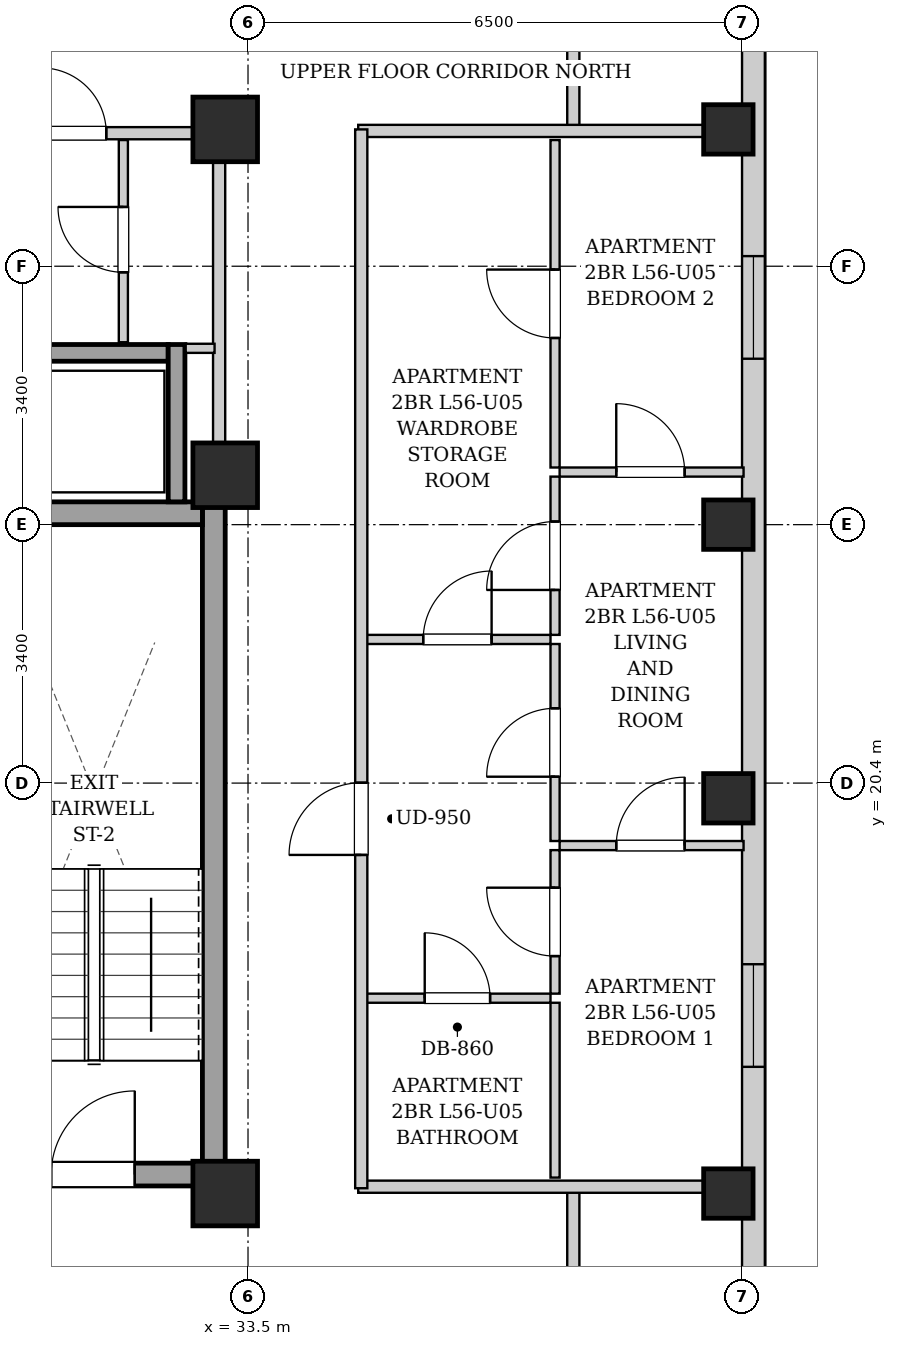
"""IFC4 building model, lengths in metres.
Left out: names, types, materials, properties, quantities, classifications, styles, units other than length and angle.
Written with IfcOpenShell. Run it as: python <this file> out.ifc"""

import sys

from ifc_helpers import new_model, si_unit, direction, frame, frame_2d, origin, origin_2d, place, context, subcontext, project, spatial, rectangle, extrude, element, fill, save


model = new_model("IFC4")
c1 = context("Model", 3, precision=1e-05, world=origin(), true_north=direction((0.0, 1.0)))
c2 = subcontext(c1, "Body", "Model", "MODEL_VIEW")
j1 = project(units=[si_unit("LENGTHUNIT", "METRE"), si_unit("PLANEANGLEUNIT", "RADIAN")], contexts=[c1])
p1 = place(None, origin())
s1 = spatial("IfcSite", under=j1, at=p1, CompositionType="ELEMENT")
p2 = place(p1, origin())
s2 = spatial("IfcBuilding", under=s1, at=p2, CompositionType="ELEMENT")
p3 = place(p2, frame((0.0, 0.0, 194.2)))
s3 = spatial("IfcBuildingStorey", under=s2, at=p3, CompositionType="ELEMENT", Elevation=194.2)
for number, where, z_axis, x_axis in (
    (1, (39.82, 15.0, 0.0), (0.0, 0.0, 1.0), (1.0, 0.0, 0.0)),
    (2, (39.82, 20.2, 0.0), (0.0, 0.0, 1.0), (1.0, 0.0, 0.0)),
    (3, (39.82, 23.8, 0.0), (0.0, 0.0, 1.0), (1.0, 0.0, 0.0)),
    (4, (39.82, 29.0, 0.0), (0.0, 0.0, 1.0), (1.0, 0.0, 0.0)),
):
    element("IfcColumn", number, at=place(p3, frame(where, z_axis=z_axis, x_axis=x_axis)), inside=s3, PredefinedType="COLUMN", context=c2, shape_type="SweptSolid", body=[
        extrude(rectangle(XDim=0.65, YDim=0.65, at=origin_2d()), origin(), (0.0, 0.0, 1.0), 3.3),
    ])
for number, where, z_axis, x_axis in (
    (5, (33.2, 15.0, 0.0), (0.0, 0.0, 1.0), (1.0, 0.0, 0.0)),
    (6, (33.2, 29.0, 0.0), (0.0, 0.0, 1.0), (1.0, 0.0, 0.0)),
    (7, (33.2, 24.45, 0.0), (0.0, 0.0, 1.0), (1.0, 0.0, 0.0)),
):
    element("IfcColumn", number, at=place(p3, frame(where, z_axis=z_axis, x_axis=x_axis)), inside=s3, PredefinedType="COLUMN", context=c2, shape_type="SweptSolid", body=[
        extrude(rectangle(XDim=0.85, YDim=0.85, at=origin_2d()), origin(), (0.0, 0.0, 1.0), 3.3),
    ])
p4 = place(p3, frame((40.15, 37.7, 0.0), z_axis=(0.0, 0.0, 1.0), x_axis=(0.0, -1.0, 0.0)))
e8 = element("IfcWall", 8, at=p4, inside=s3, PredefinedType="SOLIDWALL", context=c2, shape_type="SweptSolid", body=[
    extrude(rectangle(XDim=31.4, YDim=0.3, at=frame_2d((15.7, 0.0))), origin(), (0.0, 0.0, 1.0), 3.04),
])
p5 = place(p4, frame((28.396, 0.0, 0.55)))
e9 = element("IfcOpeningElement", 9, at=p5, cuts=e8, PredefinedType="OPENING", context=c2, shape_type="SweptSolid", body=[
    extrude(rectangle(XDim=1.35, YDim=1.2, at=frame_2d((0.675, 0.6))), frame((0.0, 0.16, 0.0), z_axis=(0.0, -1.0, 0.0), x_axis=(1.0, 0.0, 0.0)), (0.0, 0.0, 1.0), 0.32),
])
p6 = place(p4, frame((1.653, 0.0, 0.55)))
e10 = element("IfcOpeningElement", 10, at=p6, cuts=e8, PredefinedType="OPENING", context=c2, shape_type="SweptSolid", body=[
    extrude(rectangle(XDim=1.35, YDim=1.2, at=frame_2d((0.675, 0.6))), frame((0.0, 0.16, 0.0), z_axis=(0.0, -1.0, 0.0), x_axis=(1.0, 0.0, 0.0)), (0.0, 0.0, 1.0), 0.32),
])
p7 = place(p4, frame((19.683, 0.0, 0.55)))
e11 = element("IfcOpeningElement", 11, at=p7, cuts=e8, PredefinedType="OPENING", context=c2, shape_type="SweptSolid", body=[
    extrude(rectangle(XDim=1.35, YDim=1.2, at=frame_2d((0.675, 0.6))), frame((0.0, 0.16, 0.0), z_axis=(0.0, -1.0, 0.0), x_axis=(1.0, 0.0, 0.0)), (0.0, 0.0, 1.0), 0.32),
])
p8 = place(p4, frame((10.367, 0.0, 0.55)))
e12 = element("IfcOpeningElement", 12, at=p8, cuts=e8, PredefinedType="OPENING", context=c2, shape_type="SweptSolid", body=[
    extrude(rectangle(XDim=1.35, YDim=1.2, at=frame_2d((0.675, 0.6))), frame((0.0, 0.16, 0.0), z_axis=(0.0, -1.0, 0.0), x_axis=(1.0, 0.0, 0.0)), (0.0, 0.0, 1.0), 0.32),
])
p9 = place(p3, frame((33.05, 15.1, 0.0), z_axis=(0.0, 0.0, 1.0), x_axis=(0.0, 1.0, 0.0)))
e13 = element("IfcWall", 13, at=p9, inside=s3, PredefinedType="SHEAR", context=c2, shape_type="SweptSolid", body=[
    extrude(rectangle(XDim=9.0, YDim=0.3, at=frame_2d((4.5, 0.0))), origin(), (0.0, 0.0, 1.0), 3.04),
])
p10 = place(p3, frame((30.05, 23.95, 0.0), z_axis=(0.0, 0.0, 1.0), x_axis=(1.0, 0.0, 0.0)))
e14 = element("IfcWall", 14, at=p10, inside=s3, PredefinedType="SHEAR", context=c2, shape_type="SweptSolid", body=[
    extrude(rectangle(XDim=2.85, YDim=0.3, at=frame_2d((1.425, 0.0))), origin(), (0.0, 0.0, 1.0), 3.04),
])
p11 = place(p3, frame((30.05, 15.25, 0.0), z_axis=(0.0, 0.0, 1.0), x_axis=(1.0, 0.0, 0.0)))
e15 = element("IfcWall", 15, at=p11, inside=s3, PredefinedType="SHEAR", context=c2, shape_type="SweptSolid", body=[
    extrude(rectangle(XDim=2.85, YDim=0.3, at=frame_2d((1.425, 0.0))), origin(), (0.0, 0.0, 1.0), 3.04),
])
p12 = place(p11, frame((0.86, 0.0, 0.0)))
e16 = element("IfcOpeningElement", 16, at=p12, cuts=e15, PredefinedType="OPENING", context=c2, shape_type="SweptSolid", body=[
    extrude(rectangle(XDim=1.1, YDim=2.05, at=frame_2d((0.55, 1.025))), frame((0.0, 0.16, 0.0), z_axis=(0.0, -1.0, 0.0), x_axis=(1.0, 0.0, 0.0)), (0.0, 0.0, 1.0), 0.32),
])
p13 = place(p3, frame((30.55, 26.06, 0.0), z_axis=(0.0, 0.0, 1.0), x_axis=(1.0, 0.0, 0.0)))
e17 = element("IfcWall", 17, at=p13, inside=s3, PredefinedType="SHEAR", context=c2, shape_type="SweptSolid", body=[
    extrude(rectangle(XDim=1.9, YDim=0.22, at=frame_2d((0.95, 0.0))), origin(), (0.0, 0.0, 1.0), 3.04),
])
p14 = place(p3, frame((32.56, 24.1, 0.0), z_axis=(0.0, 0.0, 1.0), x_axis=(0.0, 1.0, 0.0)))
e18 = element("IfcWall", 18, at=p14, inside=s3, PredefinedType="SHEAR", context=c2, shape_type="SweptSolid", body=[
    extrude(rectangle(XDim=2.07, YDim=0.22, at=frame_2d((1.035, 0.0))), origin(), (0.0, 0.0, 1.0), 3.04),
])
p15 = place(p3, frame((33.12, 24.12, 0.0), z_axis=(0.0, 0.0, 1.0), x_axis=(0.0, 1.0, 0.0)))
e19 = element("IfcWall", 19, at=p15, inside=s3, PredefinedType="PARTITIONING", context=c2, shape_type="SweptSolid", body=[
    extrude(rectangle(XDim=4.76, YDim=0.16, at=frame_2d((2.38, 0.0))), origin(), (0.0, 0.0, 1.0), 3.04),
])
p16 = place(p3, frame((32.68, 26.12, 0.0), z_axis=(0.0, 0.0, 1.0), x_axis=(1.0, 0.0, 0.0)))
e20 = element("IfcWall", 20, at=p16, inside=s3, PredefinedType="PARTITIONING", context=c2, shape_type="SweptSolid", body=[
    extrude(rectangle(XDim=0.38, YDim=0.12, at=frame_2d((0.19, 0.0))), origin(), (0.0, 0.0, 1.0), 3.04),
])
p17 = place(p3, frame((31.86, 26.2, 0.0), z_axis=(0.0, 0.0, 1.0), x_axis=(0.0, 1.0, 0.0)))
e21 = element("IfcWall", 21, at=p17, inside=s3, PredefinedType="PARTITIONING", context=c2, shape_type="SweptSolid", body=[
    extrude(rectangle(XDim=2.66, YDim=0.12, at=frame_2d((1.33, 0.0))), origin(), (0.0, 0.0, 1.0), 3.04),
])
p18 = place(p17, frame((0.92, 0.0, 0.0)))
e22 = element("IfcOpeningElement", 22, at=p18, cuts=e21, PredefinedType="OPENING", context=c2, shape_type="SweptSolid", body=[
    extrude(rectangle(XDim=0.86, YDim=2.05, at=frame_2d((0.43, 1.025))), frame((0.0, 0.07, 0.0), z_axis=(0.0, -1.0, 0.0), x_axis=(1.0, 0.0, 0.0)), (0.0, 0.0, 1.0), 0.14),
])
p19 = place(p3, frame((30.08, 28.95, 0.0), z_axis=(0.0, 0.0, 1.0), x_axis=(1.0, 0.0, 0.0)))
e23 = element("IfcWall", 23, at=p19, inside=s3, PredefinedType="PARTITIONING", context=c2, shape_type="SweptSolid", body=[
    extrude(rectangle(XDim=2.96, YDim=0.16, at=frame_2d((1.48, 0.0))), origin(), (0.0, 0.0, 1.0), 3.04),
])
p20 = place(p19, frame((0.695, 0.0, 0.0)))
e24 = element("IfcOpeningElement", 24, at=p20, cuts=e23, PredefinedType="OPENING", context=c2, shape_type="SweptSolid", body=[
    extrude(rectangle(XDim=0.86, YDim=2.05, at=frame_2d((0.43, 1.025))), frame((0.0, 0.09, 0.0), z_axis=(0.0, -1.0, 0.0), x_axis=(1.0, 0.0, 0.0)), (0.0, 0.0, 1.0), 0.18),
])
for number, where, z_axis, x_axis in (
    (25, (37.78, 13.51, 0.0), (0.0, 0.0, 1.0), (0.0, 1.0, 0.0)),
    (26, (37.78, 28.98, 0.0), (0.0, 0.0, 1.0), (0.0, 1.0, 0.0)),
):
    element("IfcWall", number, at=place(p3, frame(where, z_axis=z_axis, x_axis=x_axis)), inside=s3, PredefinedType="PARTITIONING", context=c2, shape_type="SweptSolid", body=[
        extrude(rectangle(XDim=1.58, YDim=0.16, at=frame_2d((0.79, 0.0))), origin(), (0.0, 0.0, 1.0), 3.04),
    ])
for number, where, z_axis, x_axis in (
    (27, (34.95, 15.09, 0.0), (0.0, 0.0, 1.0), (1.0, 0.0, 0.0)),
    (28, (34.95, 28.98, 0.0), (0.0, 0.0, 1.0), (1.0, 0.0, 0.0)),
):
    element("IfcWall", number, at=place(p3, frame(where, z_axis=z_axis, x_axis=x_axis)), inside=s3, PredefinedType="PARTITIONING", context=c2, shape_type="SweptSolid", body=[
        extrude(rectangle(XDim=5.07, YDim=0.16, at=frame_2d((2.535, 0.0))), origin(), (0.0, 0.0, 1.0), 2.556),
    ])
p21 = place(p3, frame((35.03, 22.29, 0.0), z_axis=(0.0, 0.0, 1.0), x_axis=(1.0, 0.0, 0.0)))
e29 = element("IfcWall", 29, at=p21, inside=s3, PredefinedType="PARTITIONING", context=c2, shape_type="SweptSolid", body=[
    extrude(rectangle(XDim=2.45, YDim=0.12, at=frame_2d((1.225, 0.0))), origin(), (0.0, 0.0, 1.0), 3.04),
])
p22 = place(p21, frame((0.775, 0.0, 0.0)))
e30 = element("IfcOpeningElement", 30, at=p22, cuts=e29, PredefinedType="OPENING", context=c2, shape_type="SweptSolid", body=[
    extrude(rectangle(XDim=0.9, YDim=2.05, at=frame_2d((0.45, 1.025))), frame((0.0, 0.07, 0.0), z_axis=(0.0, -1.0, 0.0), x_axis=(1.0, 0.0, 0.0)), (0.0, 0.0, 1.0), 0.14),
])
p23 = place(p3, frame((37.54, 22.35, 0.0), z_axis=(0.0, 0.0, 1.0), x_axis=(0.0, 1.0, 0.0)))
e31 = element("IfcWall", 31, at=p23, inside=s3, PredefinedType="PARTITIONING", context=c2, shape_type="SweptSolid", body=[
    extrude(rectangle(XDim=2.082, YDim=0.12, at=frame_2d((1.041, 0.0))), origin(), (0.0, 0.0, 1.0), 3.04),
])
p24 = place(p23, frame((0.591, 0.0, 0.0)))
e32 = element("IfcOpeningElement", 32, at=p24, cuts=e31, PredefinedType="OPENING", context=c2, shape_type="SweptSolid", body=[
    extrude(rectangle(XDim=0.9, YDim=2.05, at=frame_2d((0.45, 1.025))), frame((0.0, 0.07, 0.0), z_axis=(0.0, -1.0, 0.0), x_axis=(1.0, 0.0, 0.0)), (0.0, 0.0, 1.0), 0.14),
])
p25 = place(p3, frame((37.54, 24.552, 0.0), z_axis=(0.0, 0.0, 1.0), x_axis=(0.0, 1.0, 0.0)))
e33 = element("IfcWall", 33, at=p25, inside=s3, PredefinedType="PARTITIONING", context=c2, shape_type="SweptSolid", body=[
    extrude(rectangle(XDim=4.308, YDim=0.12, at=frame_2d((2.154, 0.0))), origin(), (0.0, 0.0, 1.0), 3.04),
])
p26 = place(p25, frame((1.704, 0.0, 0.0)))
e34 = element("IfcOpeningElement", 34, at=p26, cuts=e33, PredefinedType="OPENING", context=c2, shape_type="SweptSolid", body=[
    extrude(rectangle(XDim=0.9, YDim=2.05, at=frame_2d((0.45, 1.025))), frame((0.0, 0.07, 0.0), z_axis=(0.0, -1.0, 0.0), x_axis=(1.0, 0.0, 0.0)), (0.0, 0.0, 1.0), 0.14),
])
p27 = place(p3, frame((35.03, 17.57, 0.0), z_axis=(0.0, 0.0, 1.0), x_axis=(1.0, 0.0, 0.0)))
e35 = element("IfcWall", 35, at=p27, inside=s3, PredefinedType="PARTITIONING", context=c2, shape_type="SweptSolid", body=[
    extrude(rectangle(XDim=2.45, YDim=0.12, at=frame_2d((1.225, 0.0))), origin(), (0.0, 0.0, 1.0), 3.04),
])
p28 = place(p27, frame((0.795, 0.0, 0.0)))
e36 = element("IfcOpeningElement", 36, at=p28, cuts=e35, PredefinedType="OPENING", context=c2, shape_type="SweptSolid", body=[
    extrude(rectangle(XDim=0.86, YDim=2.05, at=frame_2d((0.43, 1.025))), frame((0.0, 0.07, 0.0), z_axis=(0.0, -1.0, 0.0), x_axis=(1.0, 0.0, 0.0)), (0.0, 0.0, 1.0), 0.14),
])
p29 = place(p3, frame((37.54, 15.21, 0.0), z_axis=(0.0, 0.0, 1.0), x_axis=(0.0, 1.0, 0.0)))
e37 = element("IfcWall", 37, at=p29, inside=s3, PredefinedType="PARTITIONING", context=c2, shape_type="SweptSolid", body=[
    extrude(rectangle(XDim=2.3, YDim=0.12, at=frame_2d((1.15, 0.0))), origin(), (0.0, 0.0, 1.0), 3.04),
])
p30 = place(p3, frame((37.54, 17.63, 0.0), z_axis=(0.0, 0.0, 1.0), x_axis=(0.0, 1.0, 0.0)))
e38 = element("IfcWall", 38, at=p30, inside=s3, PredefinedType="PARTITIONING", context=c2, shape_type="SweptSolid", body=[
    extrude(rectangle(XDim=1.888, YDim=0.12, at=frame_2d((0.944, 0.0))), origin(), (0.0, 0.0, 1.0), 3.04),
])
p31 = place(p30, frame((0.494, 0.0, 0.0)))
e39 = element("IfcOpeningElement", 39, at=p31, cuts=e38, PredefinedType="OPENING", context=c2, shape_type="SweptSolid", body=[
    extrude(rectangle(XDim=0.9, YDim=2.05, at=frame_2d((0.45, 1.025))), frame((0.0, 0.07, 0.0), z_axis=(0.0, -1.0, 0.0), x_axis=(1.0, 0.0, 0.0)), (0.0, 0.0, 1.0), 0.14),
])
p32 = place(p3, frame((37.54, 19.638, 0.0), z_axis=(0.0, 0.0, 1.0), x_axis=(0.0, 1.0, 0.0)))
e40 = element("IfcWall", 40, at=p32, inside=s3, PredefinedType="PARTITIONING", context=c2, shape_type="SweptSolid", body=[
    extrude(rectangle(XDim=2.592, YDim=0.12, at=frame_2d((1.296, 0.0))), origin(), (0.0, 0.0, 1.0), 3.04),
])
p33 = place(p32, frame((0.846, 0.0, 0.0)))
e41 = element("IfcOpeningElement", 41, at=p33, cuts=e40, PredefinedType="OPENING", context=c2, shape_type="SweptSolid", body=[
    extrude(rectangle(XDim=0.9, YDim=2.05, at=frame_2d((0.45, 1.025))), frame((0.0, 0.07, 0.0), z_axis=(0.0, -1.0, 0.0), x_axis=(1.0, 0.0, 0.0)), (0.0, 0.0, 1.0), 0.14),
])
p34 = place(p3, frame((37.6, 19.578, 0.0), z_axis=(0.0, 0.0, 1.0), x_axis=(1.0, 0.0, 0.0)))
e42 = element("IfcWall", 42, at=p34, inside=s3, PredefinedType="PARTITIONING", context=c2, shape_type="SweptSolid", body=[
    extrude(rectangle(XDim=2.42, YDim=0.12, at=frame_2d((1.21, 0.0))), origin(), (0.0, 0.0, 1.0), 3.04),
])
p35 = place(p34, frame((0.745, 0.0, 0.0)))
e43 = element("IfcOpeningElement", 43, at=p35, cuts=e42, PredefinedType="OPENING", context=c2, shape_type="SweptSolid", body=[
    extrude(rectangle(XDim=0.9, YDim=2.05, at=frame_2d((0.45, 1.025))), frame((0.0, 0.07, 0.0), z_axis=(0.0, -1.0, 0.0), x_axis=(1.0, 0.0, 0.0)), (0.0, 0.0, 1.0), 0.14),
])
p36 = place(p3, frame((37.6, 24.492, 0.0), z_axis=(0.0, 0.0, 1.0), x_axis=(1.0, 0.0, 0.0)))
e44 = element("IfcWall", 44, at=p36, inside=s3, PredefinedType="PARTITIONING", context=c2, shape_type="SweptSolid", body=[
    extrude(rectangle(XDim=2.42, YDim=0.12, at=frame_2d((1.21, 0.0))), origin(), (0.0, 0.0, 1.0), 2.722),
])
p37 = place(p36, frame((0.745, 0.0, 0.0)))
e45 = element("IfcOpeningElement", 45, at=p37, cuts=e44, PredefinedType="OPENING", context=c2, shape_type="SweptSolid", body=[
    extrude(rectangle(XDim=0.9, YDim=2.05, at=frame_2d((0.45, 1.025))), frame((0.0, 0.07, 0.0), z_axis=(0.0, -1.0, 0.0), x_axis=(1.0, 0.0, 0.0)), (0.0, 0.0, 1.0), 0.14),
])
p38 = place(p3, frame((34.99, 15.07, 0.0), z_axis=(0.0, 0.0, 1.0), x_axis=(0.0, 1.0, 0.0)))
e46 = element("IfcWall", 46, at=p38, inside=s3, PredefinedType="PARTITIONING", context=c2, shape_type="SweptSolid", body=[
    extrude(rectangle(XDim=13.93, YDim=0.16, at=frame_2d((6.965, 0.0))), origin(), (0.0, 0.0, 1.0), 3.04),
])
p39 = place(p38, frame((4.385, 0.0, 0.0)))
e47 = element("IfcOpeningElement", 47, at=p39, cuts=e46, PredefinedType="OPENING", context=c2, shape_type="SweptSolid", body=[
    extrude(rectangle(XDim=0.95, YDim=2.1, at=frame_2d((0.475, 1.05))), frame((0.0, 0.09, 0.0), z_axis=(0.0, -1.0, 0.0), x_axis=(1.0, 0.0, 0.0)), (0.0, 0.0, 1.0), 0.18),
])
p40 = place(p12, origin())
e48 = element("IfcDoor", 48, at=p40, inside=s3, OperationType="SINGLE_SWING_RIGHT", PredefinedType="DOOR", context=c2, shape_type="SweptSolid", body=[
    extrude(rectangle(XDim=1.1, YDim=2.05, at=frame_2d((0.55, 1.025))), frame((0.0, 0.025, 0.0), z_axis=(0.0, -1.0, 0.0), x_axis=(1.0, 0.0, 0.0)), (0.0, 0.0, 1.0), 0.05),
])
fill(e16, e48)
p41 = place(p18, origin())
e49 = element("IfcDoor", 49, at=p41, inside=s3, OperationType="SINGLE_SWING_RIGHT", PredefinedType="DOOR", context=c2, shape_type="SweptSolid", body=[
    extrude(rectangle(XDim=0.86, YDim=2.05, at=frame_2d((0.43, 1.025))), frame((0.0, 0.025, 0.0), z_axis=(0.0, -1.0, 0.0), x_axis=(1.0, 0.0, 0.0)), (0.0, 0.0, 1.0), 0.05),
])
fill(e22, e49)
p42 = place(p20, origin())
e50 = element("IfcDoor", 50, at=p42, inside=s3, OperationType="SINGLE_SWING_LEFT", PredefinedType="DOOR", context=c2, shape_type="SweptSolid", body=[
    extrude(rectangle(XDim=0.86, YDim=2.05, at=frame_2d((0.43, 1.025))), frame((0.0, 0.025, 0.0), z_axis=(0.0, -1.0, 0.0), x_axis=(1.0, 0.0, 0.0)), (0.0, 0.0, 1.0), 0.05),
])
fill(e24, e50)
p43 = place(p22, origin())
e51 = element("IfcDoor", 51, at=p43, inside=s3, OperationType="SINGLE_SWING_RIGHT", PredefinedType="DOOR", context=c2, shape_type="SweptSolid", body=[
    extrude(rectangle(XDim=0.9, YDim=2.05, at=frame_2d((0.45, 1.025))), frame((0.0, 0.025, 0.0), z_axis=(0.0, -1.0, 0.0), x_axis=(1.0, 0.0, 0.0)), (0.0, 0.0, 1.0), 0.05),
])
fill(e30, e51)
p44 = place(p24, origin())
e52 = element("IfcDoor", 52, at=p44, inside=s3, OperationType="SINGLE_SWING_LEFT", PredefinedType="DOOR", context=c2, shape_type="SweptSolid", body=[
    extrude(rectangle(XDim=0.9, YDim=2.05, at=frame_2d((0.45, 1.025))), frame((0.0, 0.025, 0.0), z_axis=(0.0, -1.0, 0.0), x_axis=(1.0, 0.0, 0.0)), (0.0, 0.0, 1.0), 0.05),
])
fill(e32, e52)
p45 = place(p26, origin())
e53 = element("IfcDoor", 53, at=p45, inside=s3, OperationType="SINGLE_SWING_RIGHT", PredefinedType="DOOR", context=c2, shape_type="SweptSolid", body=[
    extrude(rectangle(XDim=0.9, YDim=2.05, at=frame_2d((0.45, 1.025))), frame((0.0, 0.025, 0.0), z_axis=(0.0, -1.0, 0.0), x_axis=(1.0, 0.0, 0.0)), (0.0, 0.0, 1.0), 0.05),
])
fill(e34, e53)
p46 = place(p28, origin())
e54 = element("IfcDoor", 54, at=p46, inside=s3, OperationType="SINGLE_SWING_LEFT", PredefinedType="DOOR", context=c2, shape_type="SweptSolid", body=[
    extrude(rectangle(XDim=0.86, YDim=2.05, at=frame_2d((0.43, 1.025))), frame((0.0, 0.025, 0.0), z_axis=(0.0, -1.0, 0.0), x_axis=(1.0, 0.0, 0.0)), (0.0, 0.0, 1.0), 0.05),
])
fill(e36, e54)
p47 = place(p31, origin())
e55 = element("IfcDoor", 55, at=p47, inside=s3, OperationType="SINGLE_SWING_RIGHT", PredefinedType="DOOR", context=c2, shape_type="SweptSolid", body=[
    extrude(rectangle(XDim=0.9, YDim=2.05, at=frame_2d((0.45, 1.025))), frame((0.0, 0.025, 0.0), z_axis=(0.0, -1.0, 0.0), x_axis=(1.0, 0.0, 0.0)), (0.0, 0.0, 1.0), 0.05),
])
fill(e39, e55)
p48 = place(p33, origin())
e56 = element("IfcDoor", 56, at=p48, inside=s3, OperationType="SINGLE_SWING_LEFT", PredefinedType="DOOR", context=c2, shape_type="SweptSolid", body=[
    extrude(rectangle(XDim=0.9, YDim=2.05, at=frame_2d((0.45, 1.025))), frame((0.0, 0.025, 0.0), z_axis=(0.0, -1.0, 0.0), x_axis=(1.0, 0.0, 0.0)), (0.0, 0.0, 1.0), 0.05),
])
fill(e41, e56)
p49 = place(p35, origin())
e57 = element("IfcDoor", 57, at=p49, inside=s3, OperationType="SINGLE_SWING_RIGHT", PredefinedType="DOOR", context=c2, shape_type="SweptSolid", body=[
    extrude(rectangle(XDim=0.9, YDim=2.05, at=frame_2d((0.45, 1.025))), frame((0.0, 0.025, 0.0), z_axis=(0.0, -1.0, 0.0), x_axis=(1.0, 0.0, 0.0)), (0.0, 0.0, 1.0), 0.05),
])
fill(e43, e57)
p50 = place(p37, origin())
e58 = element("IfcDoor", 58, at=p50, inside=s3, OperationType="SINGLE_SWING_LEFT", PredefinedType="DOOR", context=c2, shape_type="SweptSolid", body=[
    extrude(rectangle(XDim=0.9, YDim=2.05, at=frame_2d((0.45, 1.025))), frame((0.0, 0.025, 0.0), z_axis=(0.0, -1.0, 0.0), x_axis=(1.0, 0.0, 0.0)), (0.0, 0.0, 1.0), 0.05),
])
fill(e45, e58)
p51 = place(p39, origin())
e59 = element("IfcDoor", 59, at=p51, inside=s3, OperationType="SINGLE_SWING_LEFT", PredefinedType="DOOR", context=c2, shape_type="SweptSolid", body=[
    extrude(rectangle(XDim=0.95, YDim=2.1, at=frame_2d((0.475, 1.05))), frame((0.0, 0.025, 0.0), z_axis=(0.0, -1.0, 0.0), x_axis=(1.0, 0.0, 0.0)), (0.0, 0.0, 1.0), 0.05),
])
fill(e47, e59)
p52 = place(p7, origin())
e60 = element("IfcWindow", 60, at=p52, inside=s3, PartitioningType="SINGLE_PANEL", PredefinedType="WINDOW", context=c2, shape_type="SweptSolid", body=[
    extrude(rectangle(XDim=1.35, YDim=1.2, at=frame_2d((0.675, 0.6))), frame((0.0, 0.03, 0.0), z_axis=(0.0, -1.0, 0.0), x_axis=(1.0, 0.0, 0.0)), (0.0, 0.0, 1.0), 0.06),
])
fill(e11, e60)
p53 = place(p8, origin())
e61 = element("IfcWindow", 61, at=p53, inside=s3, PartitioningType="SINGLE_PANEL", PredefinedType="WINDOW", context=c2, shape_type="SweptSolid", body=[
    extrude(rectangle(XDim=1.35, YDim=1.2, at=frame_2d((0.675, 0.6))), frame((0.0, 0.03, 0.0), z_axis=(0.0, -1.0, 0.0), x_axis=(1.0, 0.0, 0.0)), (0.0, 0.0, 1.0), 0.06),
])
fill(e12, e61)
save(model, sys.argv[1])
